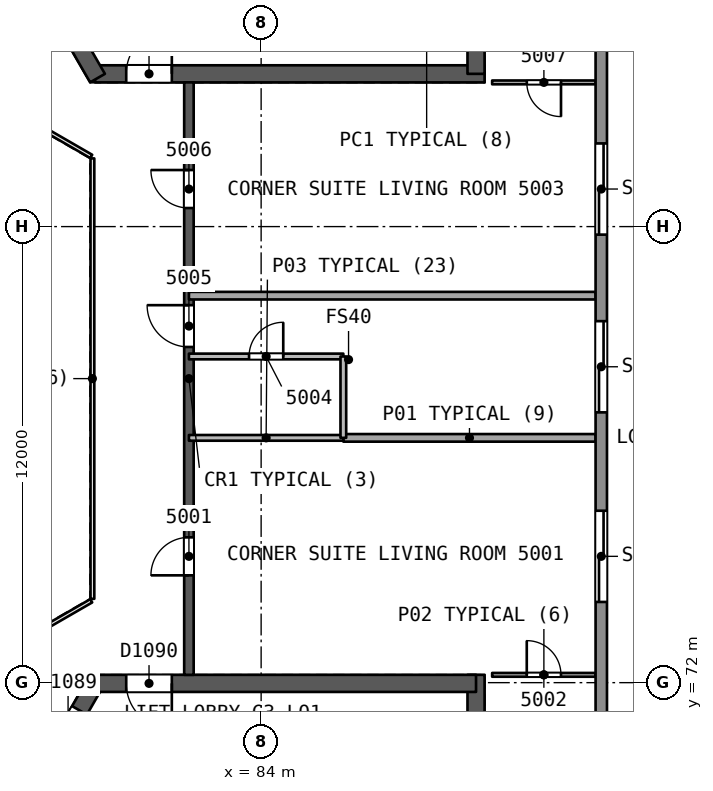
"""IFC4 building model, lengths in metres.
Left out: names, types, materials, properties, quantities, classifications, styles, units other than length and angle.
Written with IfcOpenShell. Run it as: python <this file> out.ifc"""

import sys

from ifc_helpers import new_model, si_unit, direction, frame, frame_2d, origin, place, context, subcontext, project, spatial, rectangle, extrude, element, fill, save


model = new_model("IFC4")
c1 = context("Model", 3, precision=1e-05, world=origin(), true_north=direction((0.0, 1.0)))
c2 = subcontext(c1, "Body", "Model", "MODEL_VIEW")
j1 = project(units=[si_unit("LENGTHUNIT", "METRE"), si_unit("PLANEANGLEUNIT", "RADIAN")], contexts=[c1])
p1 = place(None, origin())
s1 = spatial("IfcSite", under=j1, at=p1, CompositionType="ELEMENT")
p2 = place(p1, origin())
s2 = spatial("IfcBuilding", under=s1, at=p2, CompositionType="ELEMENT")
p3 = place(p2, frame((0.0, 0.0, 205.8)))
s3 = spatial("IfcBuildingStorey", under=s2, at=p3, CompositionType="ELEMENT", Elevation=205.8)
p4 = place(p3, frame((79.63, 88.019, 0.0), z_axis=(0.0, 0.0, 1.0), x_axis=(1.0, 0.0, 0.0)))
e1 = element("IfcWall", 1, at=p4, inside=s3, PredefinedType="SHEAR", context=c2, shape_type="SweptSolid", body=[
    extrude(rectangle(XDim=10.25, YDim=0.45, at=frame_2d((5.125, 0.0))), origin(), (0.0, 0.0, 1.0), 3.7),
])
p5 = place(p4, frame((0.82, 0.0, 0.0)))
e2 = element("IfcOpeningElement", 2, at=p5, cuts=e1, PredefinedType="OPENING", context=c2, shape_type="SweptSolid", body=[
    extrude(rectangle(XDim=1.2, YDim=2.1, at=frame_2d((0.6, 1.05))), frame((0.0, 0.235, 0.0), z_axis=(0.0, -1.0, 0.0), x_axis=(1.0, 0.0, 0.0)), (0.0, 0.0, 1.0), 0.471),
])
p6 = place(p3, frame((89.655, 88.019, 0.0), z_axis=(0.0, 0.0, 1.0), x_axis=(0.0, 1.0, 0.0)))
e3 = element("IfcWall", 3, at=p6, inside=s3, PredefinedType="SHEAR", context=c2, shape_type="SweptSolid", body=[
    extrude(rectangle(XDim=14.108, YDim=0.45, at=frame_2d((7.054, 0.0))), origin(), (0.0, 0.0, 1.0), 3.7),
])
p7 = place(p3, frame((74.617, 96.701, 0.0), z_axis=(0.0, 0.0, 1.0), x_axis=(0.499994385119, -0.866028645513, 0.0)))
e4 = element("IfcWall", 4, at=p7, inside=s3, PredefinedType="SHEAR", context=c2, shape_type="SweptSolid", body=[
    extrude(rectangle(XDim=10.155, YDim=0.45, at=frame_2d((5.077, 0.0))), origin(), (0.0, 0.0, 1.0), 3.7),
])
p8 = place(p7, frame((8.005, 0.0, 0.0)))
e5 = element("IfcOpeningElement", 5, at=p8, cuts=e4, PredefinedType="OPENING", context=c2, shape_type="SweptSolid", body=[
    extrude(rectangle(XDim=1.2, YDim=2.1, at=frame_2d((0.6, 1.05))), frame((0.0, 0.235, 0.0), z_axis=(0.0, -1.0, 0.0), x_axis=(1.0, 0.0, 0.0)), (0.0, 0.0, 1.0), 0.471),
])
p9 = place(p3, frame((79.63, 71.981, 0.0), z_axis=(0.0, 0.0, 1.0), x_axis=(-0.500002171595, -0.86602415001, 0.0)))
e6 = element("IfcWall", 6, at=p9, inside=s3, PredefinedType="SHEAR", context=c2, shape_type="SweptSolid", body=[
    extrude(rectangle(XDim=10.25, YDim=0.45, at=frame_2d((5.125, 0.0))), origin(), (0.0, 0.0, 1.0), 3.7),
])
p10 = place(p9, frame((0.82, 0.0, 0.0)))
e7 = element("IfcOpeningElement", 7, at=p10, cuts=e6, PredefinedType="OPENING", context=c2, shape_type="SweptSolid", body=[
    extrude(rectangle(XDim=1.2, YDim=2.1, at=frame_2d((0.6, 1.05))), frame((0.0, 0.235, 0.0), z_axis=(0.0, -1.0, 0.0), x_axis=(1.0, 0.0, 0.0)), (0.0, 0.0, 1.0), 0.471),
])
p11 = place(p3, frame((89.655, 58.002, 0.0), z_axis=(0.0, 0.0, 1.0), x_axis=(0.0, 1.0, 0.0)))
e8 = element("IfcWall", 8, at=p11, inside=s3, PredefinedType="SHEAR", context=c2, shape_type="SweptSolid", body=[
    extrude(rectangle(XDim=14.204, YDim=0.45, at=frame_2d((7.102, 0.0))), origin(), (0.0, 0.0, 1.0), 3.7),
])
p12 = place(p3, frame((89.655, 71.981, 0.0), z_axis=(0.0, 0.0, 1.0), x_axis=(-1.0, 0.0, 0.0)))
e9 = element("IfcWall", 9, at=p12, inside=s3, PredefinedType="SHEAR", context=c2, shape_type="SweptSolid", body=[
    extrude(rectangle(XDim=10.155, YDim=0.45, at=frame_2d((5.078, 0.0))), origin(), (0.0, 0.0, 1.0), 3.7),
])
p13 = place(p12, frame((8.005, 0.0, 0.0)))
e10 = element("IfcOpeningElement", 10, at=p13, cuts=e9, PredefinedType="OPENING", context=c2, shape_type="SweptSolid", body=[
    extrude(rectangle(XDim=1.2, YDim=2.1, at=frame_2d((0.6, 1.05))), frame((0.0, 0.235, 0.0), z_axis=(0.0, -1.0, 0.0), x_axis=(1.0, 0.0, 0.0)), (0.0, 0.0, 1.0), 0.471),
])
p14 = place(p3, frame((82.1, 72.206, 0.0), z_axis=(0.0, 0.0, 1.0), x_axis=(0.0, 1.0, 0.0)))
e11 = element("IfcWall", 11, at=p14, inside=s3, PredefinedType="SHEAR", context=c2, shape_type="SweptSolid", body=[
    extrude(rectangle(XDim=15.588, YDim=0.25, at=frame_2d((7.794, 0.0))), origin(), (0.0, 0.0, 1.0), 3.3),
])
p15 = place(p14, frame((2.618, 0.0, 0.0)))
e12 = element("IfcOpeningElement", 12, at=p15, cuts=e11, PredefinedType="OPENING", context=c2, shape_type="SweptSolid", body=[
    extrude(rectangle(XDim=1.0, YDim=2.1, at=frame_2d((0.5, 1.05))), frame((0.0, 0.135, 0.0), z_axis=(0.0, -1.0, 0.0), x_axis=(1.0, 0.0, 0.0)), (0.0, 0.0, 1.0), 0.271),
])
p16 = place(p14, frame((8.627, 0.0, 0.0)))
e13 = element("IfcOpeningElement", 13, at=p16, cuts=e11, PredefinedType="OPENING", context=c2, shape_type="SweptSolid", body=[
    extrude(rectangle(XDim=1.1, YDim=2.1, at=frame_2d((0.55, 1.05))), frame((0.0, 0.135, 0.0), z_axis=(0.0, -1.0, 0.0), x_axis=(1.0, 0.0, 0.0)), (0.0, 0.0, 1.0), 0.271),
])
p17 = place(p14, frame((12.282, 0.0, 0.0)))
e14 = element("IfcOpeningElement", 14, at=p17, cuts=e11, PredefinedType="OPENING", context=c2, shape_type="SweptSolid", body=[
    extrude(rectangle(XDim=1.0, YDim=2.1, at=frame_2d((0.5, 1.05))), frame((0.0, 0.135, 0.0), z_axis=(0.0, -1.0, 0.0), x_axis=(1.0, 0.0, 0.0)), (0.0, 0.0, 1.0), 0.271),
])
p18 = place(p3, frame((90.079, 72.206, 0.0), z_axis=(0.0, 0.0, 1.0), x_axis=(1.0, 0.0, 0.0)))
e15 = element("IfcWall", 15, at=p18, inside=s3, PredefinedType="PARTITIONING", context=c2, shape_type="SweptSolid", body=[
    extrude(rectangle(XDim=2.723, YDim=0.1, at=frame_2d((1.361, 0.0))), origin(), (0.0, 0.0, 1.0), 3.3),
])
p19 = place(p18, frame((0.911, 0.0, 0.0)))
e16 = element("IfcOpeningElement", 16, at=p19, cuts=e15, PredefinedType="OPENING", context=c2, shape_type="SweptSolid", body=[
    extrude(rectangle(XDim=0.9, YDim=2.1, at=frame_2d((0.45, 1.05))), frame((0.0, 0.061, 0.0), z_axis=(0.0, -1.0, 0.0), x_axis=(1.0, 0.0, 0.0)), (0.0, 0.0, 1.0), 0.121),
])
p20 = place(p3, frame((92.802, 78.441, 0.0), z_axis=(0.0, 0.0, 1.0), x_axis=(-1.0, 0.0, 0.0)))
e17 = element("IfcWall", 17, at=p20, inside=s3, PredefinedType="PARTITIONING", context=c2, shape_type="SweptSolid", body=[
    extrude(rectangle(XDim=6.639, YDim=0.2, at=frame_2d((3.319, 0.0))), origin(), (0.0, 0.0, 1.0), 3.3),
])
p21 = place(p3, frame((86.163, 78.441, 0.0), z_axis=(0.0, 0.0, 1.0), x_axis=(-1.0, 0.0, 0.0)))
e18 = element("IfcWall", 18, at=p21, inside=s3, PredefinedType="PARTITIONING", context=c2, shape_type="SweptSolid", body=[
    extrude(rectangle(XDim=4.063, YDim=0.15, at=frame_2d((2.031, 0.0))), origin(), (0.0, 0.0, 1.0), 3.3),
])
p22 = place(p3, frame((82.1, 80.582, 0.0), z_axis=(0.0, 0.0, 1.0), x_axis=(1.0, 0.0, 0.0)))
e19 = element("IfcWall", 19, at=p22, inside=s3, PredefinedType="PARTITIONING", context=c2, shape_type="SweptSolid", body=[
    extrude(rectangle(XDim=4.063, YDim=0.15, at=frame_2d((2.031, 0.0))), origin(), (0.0, 0.0, 1.0), 3.3),
])
p23 = place(p22, frame((1.582, 0.0, 0.0)))
e20 = element("IfcOpeningElement", 20, at=p23, cuts=e19, PredefinedType="OPENING", context=c2, shape_type="SweptSolid", body=[
    extrude(rectangle(XDim=0.9, YDim=2.1, at=frame_2d((0.45, 1.05))), frame((0.0, 0.085, 0.0), z_axis=(0.0, -1.0, 0.0), x_axis=(1.0, 0.0, 0.0)), (0.0, 0.0, 1.0), 0.171),
])
p24 = place(p3, frame((86.163, 80.582, 0.0), z_axis=(0.0, 0.0, 1.0), x_axis=(0.0, -1.0, 0.0)))
e21 = element("IfcWall", 21, at=p24, inside=s3, PredefinedType="PARTITIONING", context=c2, shape_type="SweptSolid", body=[
    extrude(rectangle(XDim=2.141, YDim=0.15, at=frame_2d((1.071, 0.0))), origin(), (0.0, 0.0, 1.0), 3.3),
])
p25 = place(p3, frame((92.802, 82.182, 0.0), z_axis=(0.0, 0.0, 1.0), x_axis=(-1.0, 0.0, 0.0)))
e22 = element("IfcWall", 22, at=p25, inside=s3, PredefinedType="PARTITIONING", context=c2, shape_type="SweptSolid", body=[
    extrude(rectangle(XDim=10.702, YDim=0.2, at=frame_2d((5.351, 0.0))), origin(), (0.0, 0.0, 1.0), 3.3),
])
p26 = place(p3, frame((92.802, 87.794, 0.0), z_axis=(0.0, 0.0, 1.0), x_axis=(-1.0, 0.0, 0.0)))
e23 = element("IfcWall", 23, at=p26, inside=s3, PredefinedType="PARTITIONING", context=c2, shape_type="SweptSolid", body=[
    extrude(rectangle(XDim=2.723, YDim=0.1, at=frame_2d((1.361, 0.0))), origin(), (0.0, 0.0, 1.0), 3.3),
])
p27 = place(p26, frame((0.911, 0.0, 0.0)))
e24 = element("IfcOpeningElement", 24, at=p27, cuts=e23, PredefinedType="OPENING", context=c2, shape_type="SweptSolid", body=[
    extrude(rectangle(XDim=0.9, YDim=2.1, at=frame_2d((0.45, 1.05))), frame((0.0, 0.061, 0.0), z_axis=(0.0, -1.0, 0.0), x_axis=(1.0, 0.0, 0.0)), (0.0, 0.0, 1.0), 0.121),
])
p28 = place(p3, frame((92.951, 105.811, 0.0), z_axis=(0.0, 0.0, 1.0), x_axis=(0.0, -1.0, 0.0)))
e25 = element("IfcWall", 25, at=p28, inside=s3, PredefinedType="SOLIDWALL", context=c2, shape_type="SweptSolid", body=[
    extrude(rectangle(XDim=51.621, YDim=0.3, at=frame_2d((25.811, 0.0))), origin(), (0.0, 0.0, 1.0), 3.3),
])
p29 = place(p28, frame((24.299, 0.0, 0.0)))
e26 = element("IfcOpeningElement", 26, at=p29, cuts=e25, PredefinedType="OPENING", context=c2, shape_type="SweptSolid", body=[
    extrude(rectangle(XDim=2.4, YDim=2.4, at=frame_2d((1.2, 1.2))), frame((0.0, 0.161, 0.0), z_axis=(0.0, -1.0, 0.0), x_axis=(1.0, 0.0, 0.0)), (0.0, 0.0, 1.0), 0.321),
])
p30 = place(p28, frame((29.287, 0.0, 0.0)))
e27 = element("IfcOpeningElement", 27, at=p30, cuts=e25, PredefinedType="OPENING", context=c2, shape_type="SweptSolid", body=[
    extrude(rectangle(XDim=2.4, YDim=2.4, at=frame_2d((1.2, 1.2))), frame((0.0, 0.161, 0.0), z_axis=(0.0, -1.0, 0.0), x_axis=(1.0, 0.0, 0.0)), (0.0, 0.0, 1.0), 0.321),
])
p31 = place(p28, frame((40.147, 0.0, 0.0)))
e28 = element("IfcOpeningElement", 28, at=p31, cuts=e25, PredefinedType="OPENING", context=c2, shape_type="SweptSolid", body=[
    extrude(rectangle(XDim=2.4, YDim=2.4, at=frame_2d((1.2, 1.2))), frame((0.0, 0.161, 0.0), z_axis=(0.0, -1.0, 0.0), x_axis=(1.0, 0.0, 0.0)), (0.0, 0.0, 1.0), 0.321),
])
p32 = place(p28, frame((19.622, 0.0, 0.0)))
e29 = element("IfcOpeningElement", 29, at=p32, cuts=e25, PredefinedType="OPENING", context=c2, shape_type="SweptSolid", body=[
    extrude(rectangle(XDim=2.4, YDim=2.4, at=frame_2d((1.2, 1.2))), frame((0.0, 0.161, 0.0), z_axis=(0.0, -1.0, 0.0), x_axis=(1.0, 0.0, 0.0)), (0.0, 0.0, 1.0), 0.321),
])
p33 = place(p28, frame((9.107, 0.0, 0.0)))
e30 = element("IfcOpeningElement", 30, at=p33, cuts=e25, PredefinedType="OPENING", context=c2, shape_type="SweptSolid", body=[
    extrude(rectangle(XDim=2.4, YDim=2.4, at=frame_2d((1.2, 1.2))), frame((0.0, 0.161, 0.0), z_axis=(0.0, -1.0, 0.0), x_axis=(1.0, 0.0, 0.0)), (0.0, 0.0, 1.0), 0.321),
])
p34 = place(p3, frame((43.672, 82.641, 0.0), z_axis=(0.0, 0.0, 1.0), x_axis=(0.866024917385, 0.500000842468, 0.0)))
e31 = element("IfcWall", 31, at=p34, inside=s3, PredefinedType="SOLIDWALL", context=c2, shape_type="SweptSolid", body=[
    extrude(rectangle(XDim=51.621, YDim=0.3, at=frame_2d((25.811, 0.0))), origin(), (0.0, 0.0, 1.0), 3.3),
])
p35 = place(p34, frame((24.611, 0.0, 0.0)))
e32 = element("IfcOpeningElement", 32, at=p35, cuts=e31, PredefinedType="OPENING", context=c2, shape_type="SweptSolid", body=[
    extrude(rectangle(XDim=2.4, YDim=2.4, at=frame_2d((1.2, 1.2))), frame((0.0, 0.161, 0.0), z_axis=(0.0, -1.0, 0.0), x_axis=(1.0, 0.0, 0.0)), (0.0, 0.0, 1.0), 0.321),
])
p36 = place(p34, frame((30.378, 0.0, 0.0)))
e33 = element("IfcOpeningElement", 33, at=p36, cuts=e31, PredefinedType="OPENING", context=c2, shape_type="SweptSolid", body=[
    extrude(rectangle(XDim=2.4, YDim=2.4, at=frame_2d((1.2, 1.2))), frame((0.0, 0.161, 0.0), z_axis=(0.0, -1.0, 0.0), x_axis=(1.0, 0.0, 0.0)), (0.0, 0.0, 1.0), 0.321),
])
p37 = place(p34, frame((40.147, 0.0, 0.0)))
e34 = element("IfcOpeningElement", 34, at=p37, cuts=e31, PredefinedType="OPENING", context=c2, shape_type="SweptSolid", body=[
    extrude(rectangle(XDim=2.4, YDim=2.4, at=frame_2d((1.2, 1.2))), frame((0.0, 0.161, 0.0), z_axis=(0.0, -1.0, 0.0), x_axis=(1.0, 0.0, 0.0)), (0.0, 0.0, 1.0), 0.321),
])
p38 = place(p34, frame((18.843, 0.0, 0.0)))
e35 = element("IfcOpeningElement", 35, at=p38, cuts=e31, PredefinedType="OPENING", context=c2, shape_type="SweptSolid", body=[
    extrude(rectangle(XDim=2.4, YDim=2.4, at=frame_2d((1.2, 1.2))), frame((0.0, 0.161, 0.0), z_axis=(0.0, -1.0, 0.0), x_axis=(1.0, 0.0, 0.0)), (0.0, 0.0, 1.0), 0.321),
])
p39 = place(p34, frame((9.107, 0.0, 0.0)))
e36 = element("IfcOpeningElement", 36, at=p39, cuts=e31, PredefinedType="OPENING", context=c2, shape_type="SweptSolid", body=[
    extrude(rectangle(XDim=2.4, YDim=2.4, at=frame_2d((1.2, 1.2))), frame((0.0, 0.161, 0.0), z_axis=(0.0, -1.0, 0.0), x_axis=(1.0, 0.0, 0.0)), (0.0, 0.0, 1.0), 0.321),
])
p40 = place(p3, frame((88.377, 51.549, 0.0), z_axis=(0.0, 0.0, 1.0), x_axis=(-0.866024917385, 0.500000842468, 0.0)))
e37 = element("IfcWall", 37, at=p40, inside=s3, PredefinedType="SOLIDWALL", context=c2, shape_type="SweptSolid", body=[
    extrude(rectangle(XDim=51.621, YDim=0.3, at=frame_2d((25.811, 0.0))), origin(), (0.0, 0.0, 1.0), 3.3),
])
p41 = place(p40, frame((29.911, 0.0, 0.0)))
e38 = element("IfcOpeningElement", 38, at=p41, cuts=e37, PredefinedType="OPENING", context=c2, shape_type="SweptSolid", body=[
    extrude(rectangle(XDim=2.4, YDim=2.4, at=frame_2d((1.2, 1.2))), frame((0.0, 0.161, 0.0), z_axis=(0.0, -1.0, 0.0), x_axis=(1.0, 0.0, 0.0)), (0.0, 0.0, 1.0), 0.321),
])
p42 = place(p40, frame((40.147, 0.0, 0.0)))
e39 = element("IfcOpeningElement", 39, at=p42, cuts=e37, PredefinedType="OPENING", context=c2, shape_type="SweptSolid", body=[
    extrude(rectangle(XDim=2.4, YDim=2.4, at=frame_2d((1.2, 1.2))), frame((0.0, 0.161, 0.0), z_axis=(0.0, -1.0, 0.0), x_axis=(1.0, 0.0, 0.0)), (0.0, 0.0, 1.0), 0.321),
])
p43 = place(p40, frame((19.934, 0.0, 0.0)))
e40 = element("IfcOpeningElement", 40, at=p43, cuts=e37, PredefinedType="OPENING", context=c2, shape_type="SweptSolid", body=[
    extrude(rectangle(XDim=2.4, YDim=2.4, at=frame_2d((1.2, 1.2))), frame((0.0, 0.161, 0.0), z_axis=(0.0, -1.0, 0.0), x_axis=(1.0, 0.0, 0.0)), (0.0, 0.0, 1.0), 0.321),
])
p44 = place(p40, frame((9.107, 0.0, 0.0)))
e41 = element("IfcOpeningElement", 41, at=p44, cuts=e37, PredefinedType="OPENING", context=c2, shape_type="SweptSolid", body=[
    extrude(rectangle(XDim=2.4, YDim=2.4, at=frame_2d((1.2, 1.2))), frame((0.0, 0.161, 0.0), z_axis=(0.0, -1.0, 0.0), x_axis=(1.0, 0.0, 0.0)), (0.0, 0.0, 1.0), 0.321),
])
p45 = place(p40, frame((25.534, 0.0, 0.9)))
e42 = element("IfcOpeningElement", 42, at=p45, cuts=e37, PredefinedType="OPENING", context=c2, shape_type="SweptSolid", body=[
    extrude(rectangle(XDim=1.8, YDim=1.5, at=frame_2d((0.9, 0.75))), frame((0.0, 0.161, 0.0), z_axis=(0.0, -1.0, 0.0), x_axis=(1.0, 0.0, 0.0)), (0.0, 0.0, 1.0), 0.321),
])
p46 = place(p3, frame((79.56, 74.206, 0.0), z_axis=(0.0, 0.0, 1.0), x_axis=(0.0, 1.0, 0.0)))
e43 = element("IfcWall", 43, at=p46, inside=s3, PredefinedType="PARTITIONING", context=c2, shape_type="SweptSolid", body=[
    extrude(rectangle(XDim=11.588, YDim=0.1, at=frame_2d((5.794, 0.0))), origin(), (0.0, 0.0, 1.0), 3.3),
])
for number, where, z_axis, x_axis in (
    (44, (79.53, 85.846, 0.0), (0.0, 0.0, 1.0), (-0.866, 0.5, 0.0)),
    (45, (77.798, 73.154, 0.0), (0.0, 0.0, 1.0), (0.866, 0.5, 0.0)),
):
    element("IfcWall", number, at=place(p3, frame(where, z_axis=z_axis, x_axis=x_axis)), inside=s3, PredefinedType="PARTITIONING", context=c2, shape_type="SweptSolid", body=[
        extrude(rectangle(XDim=2.0, YDim=0.1, at=frame_2d((1.0, 0.0))), origin(), (0.0, 0.0, 1.0), 3.3),
    ])
p47 = place(p15, origin())
e46 = element("IfcDoor", 46, at=p47, inside=s3, OperationType="SINGLE_SWING_LEFT", PredefinedType="NOTDEFINED", context=c2, shape_type="SweptSolid", body=[
    extrude(rectangle(XDim=1.0, YDim=2.1, at=frame_2d((0.5, 1.05))), frame((0.0, 0.025, 0.0), z_axis=(0.0, -1.0, 0.0), x_axis=(1.0, 0.0, 0.0)), (0.0, 0.0, 1.0), 0.05),
])
fill(e12, e46)
p48 = place(p19, origin())
e47 = element("IfcDoor", 47, at=p48, inside=s3, OperationType="SINGLE_SWING_LEFT", PredefinedType="NOTDEFINED", context=c2, shape_type="SweptSolid", body=[
    extrude(rectangle(XDim=0.9, YDim=2.1, at=frame_2d((0.45, 1.05))), frame((0.0, 0.025, 0.0), z_axis=(0.0, -1.0, 0.0), x_axis=(1.0, 0.0, 0.0)), (0.0, 0.0, 1.0), 0.05),
])
fill(e16, e47)
p49 = place(p23, origin())
e48 = element("IfcDoor", 48, at=p49, inside=s3, OperationType="SINGLE_SWING_RIGHT", PredefinedType="NOTDEFINED", context=c2, shape_type="SweptSolid", body=[
    extrude(rectangle(XDim=0.9, YDim=2.1, at=frame_2d((0.45, 1.05))), frame((0.0, 0.025, 0.0), z_axis=(0.0, -1.0, 0.0), x_axis=(1.0, 0.0, 0.0)), (0.0, 0.0, 1.0), 0.05),
])
fill(e20, e48)
p50 = place(p16, origin())
e49 = element("IfcDoor", 49, at=p50, inside=s3, OperationType="SINGLE_SWING_RIGHT", PredefinedType="NOTDEFINED", context=c2, shape_type="SweptSolid", body=[
    extrude(rectangle(XDim=1.1, YDim=2.1, at=frame_2d((0.55, 1.05))), frame((0.0, 0.025, 0.0), z_axis=(0.0, -1.0, 0.0), x_axis=(1.0, 0.0, 0.0)), (0.0, 0.0, 1.0), 0.05),
])
fill(e13, e49)
p51 = place(p17, origin())
e50 = element("IfcDoor", 50, at=p51, inside=s3, OperationType="SINGLE_SWING_RIGHT", PredefinedType="NOTDEFINED", context=c2, shape_type="SweptSolid", body=[
    extrude(rectangle(XDim=1.0, YDim=2.1, at=frame_2d((0.5, 1.05))), frame((0.0, 0.025, 0.0), z_axis=(0.0, -1.0, 0.0), x_axis=(1.0, 0.0, 0.0)), (0.0, 0.0, 1.0), 0.05),
])
fill(e14, e50)
p52 = place(p27, origin())
e51 = element("IfcDoor", 51, at=p52, inside=s3, OperationType="SINGLE_SWING_LEFT", PredefinedType="NOTDEFINED", context=c2, shape_type="SweptSolid", body=[
    extrude(rectangle(XDim=0.9, YDim=2.1, at=frame_2d((0.45, 1.05))), frame((0.0, 0.025, 0.0), z_axis=(0.0, -1.0, 0.0), x_axis=(1.0, 0.0, 0.0)), (0.0, 0.0, 1.0), 0.05),
])
fill(e24, e51)
p53 = place(p29, origin())
e52 = element("IfcDoor", 52, at=p53, inside=s3, OperationType="SLIDING_TO_LEFT", PredefinedType="NOTDEFINED", context=c2, shape_type="SweptSolid", body=[
    extrude(rectangle(XDim=2.4, YDim=2.4, at=frame_2d((1.2, 1.2))), frame((0.0, 0.025, 0.0), z_axis=(0.0, -1.0, 0.0), x_axis=(1.0, 0.0, 0.0)), (0.0, 0.0, 1.0), 0.05),
])
fill(e26, e52)
p54 = place(p30, origin())
e53 = element("IfcDoor", 53, at=p54, inside=s3, OperationType="SLIDING_TO_RIGHT", PredefinedType="NOTDEFINED", context=c2, shape_type="SweptSolid", body=[
    extrude(rectangle(XDim=2.4, YDim=2.4, at=frame_2d((1.2, 1.2))), frame((0.0, 0.025, 0.0), z_axis=(0.0, -1.0, 0.0), x_axis=(1.0, 0.0, 0.0)), (0.0, 0.0, 1.0), 0.05),
])
fill(e27, e53)
p55 = place(p32, origin())
e54 = element("IfcDoor", 54, at=p55, inside=s3, OperationType="SLIDING_TO_RIGHT", PredefinedType="NOTDEFINED", context=c2, shape_type="SweptSolid", body=[
    extrude(rectangle(XDim=2.4, YDim=2.4, at=frame_2d((1.2, 1.2))), frame((0.0, 0.025, 0.0), z_axis=(0.0, -1.0, 0.0), x_axis=(1.0, 0.0, 0.0)), (0.0, 0.0, 1.0), 0.05),
])
fill(e29, e54)
p56 = place(p5, origin())
e55 = element("IfcDoor", 55, at=p56, inside=s3, OperationType="SINGLE_SWING_RIGHT", PredefinedType="NOTDEFINED", context=c2, shape_type="SweptSolid", body=[
    extrude(rectangle(XDim=1.2, YDim=2.1, at=frame_2d((0.6, 1.05))), frame((0.0, 0.025, 0.0), z_axis=(0.0, -1.0, 0.0), x_axis=(1.0, 0.0, 0.0)), (0.0, 0.0, 1.0), 0.05),
])
fill(e2, e55)
p57 = place(p10, origin())
e56 = element("IfcDoor", 56, at=p57, inside=s3, OperationType="SINGLE_SWING_RIGHT", PredefinedType="NOTDEFINED", context=c2, shape_type="SweptSolid", body=[
    extrude(rectangle(XDim=1.2, YDim=2.1, at=frame_2d((0.6, 1.05))), frame((0.0, 0.025, 0.0), z_axis=(0.0, -1.0, 0.0), x_axis=(1.0, 0.0, 0.0)), (0.0, 0.0, 1.0), 0.05),
])
fill(e7, e56)
p58 = place(p13, origin())
e57 = element("IfcDoor", 57, at=p58, inside=s3, OperationType="SINGLE_SWING_LEFT", PredefinedType="NOTDEFINED", context=c2, shape_type="SweptSolid", body=[
    extrude(rectangle(XDim=1.2, YDim=2.1, at=frame_2d((0.6, 1.05))), frame((0.0, 0.025, 0.0), z_axis=(0.0, -1.0, 0.0), x_axis=(1.0, 0.0, 0.0)), (0.0, 0.0, 1.0), 0.05),
])
fill(e10, e57)
save(model, sys.argv[1])
